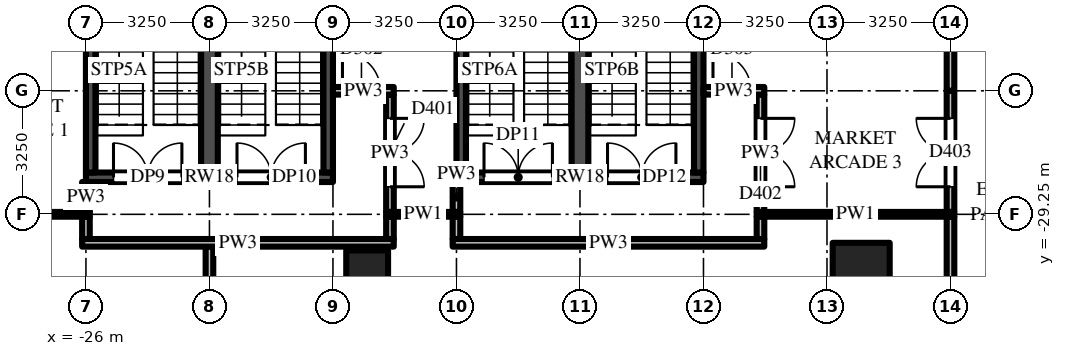
"""IFC4 building model, lengths in metres.
Left out: names, types, materials, properties, quantities, classifications, styles, units other than length and angle.
Written with IfcOpenShell. Run it as: python <this file> out.ifc"""

import sys

from ifc_helpers import new_model, si_unit, direction, frame, frame_2d, origin, origin_2d, place, context, subcontext, project, spatial, rectangle, extrude, source, transform, mapped, element, fill, save


model = new_model("IFC4")
c1 = context("Model", 3, precision=1e-05, world=origin(), true_north=direction((0.0, 1.0)))
c2 = subcontext(c1, "Body", "Model", "MODEL_VIEW")
j1 = project(units=[si_unit("LENGTHUNIT", "METRE"), si_unit("PLANEANGLEUNIT", "RADIAN")], contexts=[c1])
p1 = place(None, origin())
s1 = spatial("IfcSite", under=j1, at=p1, CompositionType="ELEMENT")
p2 = place(p1, origin())
s2 = spatial("IfcBuilding", under=s1, at=p2, CompositionType="ELEMENT")
p3 = place(p2, frame((0.0, 0.0, 19.0)))
s3 = spatial("IfcBuildingStorey", under=s2, at=p3, CompositionType="ELEMENT", Elevation=19.0)
m1 = source(origin(), c2, "Body", "SweptSolid", [
    extrude(rectangle(XDim=1.5, YDim=1.5, at=origin_2d()), origin(), (0.0, 0.0, 1.0), 5.0),
])
p4 = place(p3, frame((-5.6, -30.75, 0.0), z_axis=(0.0, 0.0, 1.0), x_axis=(1.0, 0.0, 0.0)))
e1 = element("IfcColumn", 1, at=p4, inside=s3, PredefinedType="COLUMN", context=c2, shape_type="MappedRepresentation", body=[
    mapped(m1, transform((0.0, 0.0, 0.0))),
])
m2 = source(origin(), c2, "Body", "SweptSolid", [
    extrude(rectangle(XDim=1.1, YDim=1.1, at=origin_2d()), origin(), (0.0, 0.0, 1.0), 5.0),
])
p5 = place(p3, frame((-18.6, -30.75, 0.0), z_axis=(0.0, 0.0, 1.0), x_axis=(1.0, 0.0, 0.0)))
e2 = element("IfcColumn", 2, at=p5, inside=s3, PredefinedType="COLUMN", context=c2, shape_type="MappedRepresentation", body=[
    mapped(m2, transform((0.0, 0.0, 0.0))),
])
m3 = source(origin(), c2, "Body", "SweptSolid", [
    extrude(rectangle(XDim=6.5, YDim=0.25, at=frame_2d((3.25, 0.0))), origin(), (0.0, 0.0, 1.0), 4.7),
])
p6 = place(p3, frame((-26.0, -28.275, 0.0), z_axis=(0.0, 0.0, 1.0), x_axis=(1.0, 0.0, 0.0)))
e3 = element("IfcWall", 3, at=p6, inside=s3, PredefinedType="SHEAR", context=c2, shape_type="MappedRepresentation", body=[
    mapped(m3, transform((0.0, 0.0, 0.0))),
])
m4 = source(origin(), c2, "Body", "SweptSolid", [
    extrude(rectangle(XDim=1.8, YDim=2.1, at=frame_2d((0.9, 1.05))), frame((0.0, 0.135, 0.0), z_axis=(0.0, -1.0, 0.0), x_axis=(1.0, 0.0, 0.0)), (0.0, 0.0, 1.0), 0.27),
])
p7 = place(p6, frame((0.725, 0.0, 0.0)))
e4 = element("IfcOpeningElement", 4, at=p7, cuts=e3, PredefinedType="OPENING", context=c2, shape_type="MappedRepresentation", body=[
    mapped(m4, transform((0.0, 0.0, 0.0))),
])
p8 = place(p6, frame((3.975, 0.0, 0.0)))
e5 = element("IfcOpeningElement", 5, at=p8, cuts=e3, PredefinedType="OPENING", context=c2, shape_type="MappedRepresentation", body=[
    mapped(m4, transform((0.0, 0.0, 0.0))),
])
m5 = source(origin(), c2, "Body", "SweptSolid", [
    extrude(rectangle(XDim=8.3, YDim=0.25, at=frame_2d((4.15, 0.0))), origin(), (0.0, 0.0, 1.0), 4.7),
])
for number, where, z_axis, x_axis in (
    (6, (-25.875, -28.15, 0.0), (0.0, 0.0, 1.0), (0.0, 1.0, 0.0)),
    (7, (-19.625, -28.15, 0.0), (0.0, 0.0, 1.0), (0.0, 1.0, 0.0)),
):
    element("IfcWall", number, at=place(p3, frame(where, z_axis=z_axis, x_axis=x_axis)), inside=s3, PredefinedType="SHEAR", context=c2, shape_type="MappedRepresentation", body=[
        mapped(m5, transform((0.0, 0.0, 0.0))),
    ])
m6 = source(origin(), c2, "Body", "SweptSolid", [
    extrude(rectangle(XDim=8.3, YDim=0.44, at=frame_2d((4.15, 0.0))), origin(), (0.0, 0.0, 1.0), 4.7),
])
p9 = place(p3, frame((-22.75, -28.15, 0.0), z_axis=(0.0, 0.0, 1.0), x_axis=(0.0, 1.0, 0.0)))
e8 = element("IfcWall", 8, at=p9, inside=s3, PredefinedType="SHEAR", context=c2, shape_type="MappedRepresentation", body=[
    mapped(m6, transform((0.0, 0.0, 0.0))),
])
p10 = place(p3, frame((-16.25, -28.275, 0.0), z_axis=(0.0, 0.0, 1.0), x_axis=(1.0, 0.0, 0.0)))
e9 = element("IfcWall", 9, at=p10, inside=s3, PredefinedType="SHEAR", context=c2, shape_type="MappedRepresentation", body=[
    mapped(m3, transform((0.0, 0.0, 0.0))),
])
p11 = place(p10, frame((0.725, 0.0, 0.0)))
e10 = element("IfcOpeningElement", 10, at=p11, cuts=e9, PredefinedType="OPENING", context=c2, shape_type="MappedRepresentation", body=[
    mapped(m4, transform((0.0, 0.0, 0.0))),
])
p12 = place(p10, frame((3.975, 0.0, 0.0)))
e11 = element("IfcOpeningElement", 11, at=p12, cuts=e9, PredefinedType="OPENING", context=c2, shape_type="MappedRepresentation", body=[
    mapped(m4, transform((0.0, 0.0, 0.0))),
])
for number, where, z_axis, x_axis in (
    (12, (-16.125, -28.15, 0.0), (0.0, 0.0, 1.0), (0.0, 1.0, 0.0)),
    (13, (-9.875, -28.15, 0.0), (0.0, 0.0, 1.0), (0.0, 1.0, 0.0)),
):
    element("IfcWall", number, at=place(p3, frame(where, z_axis=z_axis, x_axis=x_axis)), inside=s3, PredefinedType="SHEAR", context=c2, shape_type="MappedRepresentation", body=[
        mapped(m5, transform((0.0, 0.0, 0.0))),
    ])
p13 = place(p3, frame((-13.0, -28.15, 0.0), z_axis=(0.0, 0.0, 1.0), x_axis=(0.0, 1.0, 0.0)))
e14 = element("IfcWall", 14, at=p13, inside=s3, PredefinedType="SHEAR", context=c2, shape_type="MappedRepresentation", body=[
    mapped(m6, transform((0.0, 0.0, 0.0))),
])
m7 = source(origin(), c2, "Body", "SweptSolid", [
    extrude(rectangle(XDim=0.788, YDim=0.2, at=frame_2d((0.394, 0.0))), origin(), (0.0, 0.0, 1.0), 4.7),
])
p14 = place(p3, frame((-26.0, -29.188, 0.0), z_axis=(0.0, 0.0, 1.0), x_axis=(0.0, 1.0, 0.0)))
e15 = element("IfcWall", 15, at=p14, inside=s3, PredefinedType="PARTITIONING", context=c2, shape_type="MappedRepresentation", body=[
    mapped(m7, transform((0.0, 0.0, 0.0))),
])
m8 = source(origin(), c2, "Body", "SweptSolid", [
    extrude(rectangle(XDim=0.587, YDim=0.2, at=frame_2d((0.294, 0.0))), origin(), (0.0, 0.0, 1.0), 4.7),
])
p15 = place(p3, frame((-26.0, -29.9, 0.0), z_axis=(0.0, 0.0, 1.0), x_axis=(0.0, 1.0, 0.0)))
e16 = element("IfcWall", 16, at=p15, inside=s3, PredefinedType="PARTITIONING", context=c2, shape_type="MappedRepresentation", body=[
    mapped(m8, transform((0.0, 0.0, 0.0))),
])
m9 = source(origin(), c2, "Body", "SweptSolid", [
    extrude(rectangle(XDim=8.7, YDim=0.2, at=frame_2d((4.35, 0.0))), origin(), (0.0, 0.0, 1.0), 3.762),
])
p16 = place(p3, frame((-22.75, -38.8, 0.0), z_axis=(0.0, 0.0, 1.0), x_axis=(0.0, 1.0, 0.0)))
e17 = element("IfcWall", 17, at=p16, inside=s3, PredefinedType="PARTITIONING", context=c2, shape_type="MappedRepresentation", body=[
    mapped(m9, transform((0.0, 0.0, 0.0))),
])
m10 = source(origin(), c2, "Body", "SweptSolid", [
    extrude(rectangle(XDim=3.087, YDim=0.2, at=frame_2d((1.544, 0.0))), origin(), (0.0, 0.0, 1.0), 4.274),
])
p17 = place(p3, frame((-18.0, -26.1, 0.0), z_axis=(0.0, 0.0, 1.0), x_axis=(0.0, -1.0, 0.0)))
e18 = element("IfcWall", 18, at=p17, inside=s3, PredefinedType="PARTITIONING", context=c2, shape_type="MappedRepresentation", body=[
    mapped(m10, transform((0.0, 0.0, 0.0))),
])
m11 = source(origin(), c2, "Body", "SweptSolid", [
    extrude(rectangle(XDim=1.8, YDim=2.1, at=frame_2d((0.9, 1.05))), frame((0.0, 0.11, 0.0), z_axis=(0.0, -1.0, 0.0), x_axis=(1.0, 0.0, 0.0)), (0.0, 0.0, 1.0), 0.22),
])
p18 = place(p17, frame((0.625, 0.0, 0.0)))
e19 = element("IfcOpeningElement", 19, at=p18, cuts=e18, PredefinedType="OPENING", context=c2, shape_type="MappedRepresentation", body=[
    mapped(m11, transform((0.0, 0.0, 0.0))),
])
p19 = place(p3, frame((-18.0, -29.312, 0.0), z_axis=(0.0, 0.0, 1.0), x_axis=(0.0, -1.0, 0.0)))
e20 = element("IfcWall", 20, at=p19, inside=s3, PredefinedType="PARTITIONING", context=c2, shape_type="MappedRepresentation", body=[
    mapped(m8, transform((0.0, 0.0, 0.0))),
])
p20 = place(p3, frame((-16.25, -29.188, 0.0), z_axis=(0.0, 0.0, 1.0), x_axis=(0.0, 1.0, 0.0)))
e21 = element("IfcWall", 21, at=p20, inside=s3, PredefinedType="PARTITIONING", context=c2, shape_type="MappedRepresentation", body=[
    mapped(m7, transform((0.0, 0.0, 0.0))),
])
p21 = place(p3, frame((-16.25, -29.312, 0.0), z_axis=(0.0, 0.0, 1.0), x_axis=(0.0, -1.0, 0.0)))
e22 = element("IfcWall", 22, at=p21, inside=s3, PredefinedType="PARTITIONING", context=c2, shape_type="MappedRepresentation", body=[
    mapped(m8, transform((0.0, 0.0, 0.0))),
])
p22 = place(p3, frame((-8.25, -26.1, 0.0), z_axis=(0.0, 0.0, 1.0), x_axis=(0.0, -1.0, 0.0)))
e23 = element("IfcWall", 23, at=p22, inside=s3, PredefinedType="PARTITIONING", context=c2, shape_type="MappedRepresentation", body=[
    mapped(m10, transform((0.0, 0.0, 0.0))),
])
p23 = place(p22, frame((0.625, 0.0, 0.0)))
e24 = element("IfcOpeningElement", 24, at=p23, cuts=e23, PredefinedType="OPENING", context=c2, shape_type="MappedRepresentation", body=[
    mapped(m11, transform((0.0, 0.0, 0.0))),
])
p24 = place(p3, frame((-8.25, -29.9, 0.0), z_axis=(0.0, 0.0, 1.0), x_axis=(0.0, 1.0, 0.0)))
e25 = element("IfcWall", 25, at=p24, inside=s3, PredefinedType="PARTITIONING", context=c2, shape_type="MappedRepresentation", body=[
    mapped(m8, transform((0.0, 0.0, 0.0))),
])
m12 = source(origin(), c2, "Body", "SweptSolid", [
    extrude(rectangle(XDim=3.188, YDim=0.2, at=frame_2d((1.594, 0.0))), origin(), (0.0, 0.0, 1.0), 4.7),
])
p25 = place(p3, frame((-3.25, -29.188, 0.0), z_axis=(0.0, 0.0, 1.0), x_axis=(0.0, 1.0, 0.0)))
e26 = element("IfcWall", 26, at=p25, inside=s3, PredefinedType="PARTITIONING", context=c2, shape_type="MappedRepresentation", body=[
    mapped(m12, transform((0.0, 0.0, 0.0))),
])
p26 = place(p25, frame((0.663, 0.0, 0.0)))
e27 = element("IfcOpeningElement", 27, at=p26, cuts=e26, PredefinedType="OPENING", context=c2, shape_type="MappedRepresentation", body=[
    mapped(m11, transform((0.0, 0.0, 0.0))),
])
m13 = source(origin(), c2, "Body", "SweptSolid", [
    extrude(rectangle(XDim=6.4, YDim=0.2, at=frame_2d((3.2, 0.0))), origin(), (0.0, 0.0, 1.0), 4.7),
])
p27 = place(p3, frame((-3.25, -19.6, 0.0), z_axis=(0.0, 0.0, 1.0), x_axis=(0.0, -1.0, 0.0)))
e28 = element("IfcWall", 28, at=p27, inside=s3, PredefinedType="PARTITIONING", context=c2, shape_type="MappedRepresentation", body=[
    mapped(m13, transform((0.0, 0.0, 0.0))),
])
m14 = source(origin(), c2, "Body", "SweptSolid", [
    extrude(rectangle(XDim=9.488, YDim=0.2, at=frame_2d((4.744, 0.0))), origin(), (0.0, 0.0, 1.0), 3.918),
])
p28 = place(p3, frame((-3.25, -38.8, 0.0), z_axis=(0.0, 0.0, 1.0), x_axis=(0.0, 1.0, 0.0)))
e29 = element("IfcWall", 29, at=p28, inside=s3, PredefinedType="PARTITIONING", context=c2, shape_type="MappedRepresentation", body=[
    mapped(m14, transform((0.0, 0.0, 0.0))),
])
p29 = place(p28, frame((0.15, 0.0, 0.0)))
e30 = element("IfcOpeningElement", 30, at=p29, cuts=e29, PredefinedType="OPENING", context=c2, shape_type="MappedRepresentation", body=[
    mapped(m11, transform((0.0, 0.0, 0.0))),
])
m15 = source(origin(), c2, "Body", "SweptSolid", [
    extrude(rectangle(XDim=8.2, YDim=0.2, at=frame_2d((4.1, 0.0))), origin(), (0.0, 0.0, 1.0), 3.762),
])
p30 = place(p3, frame((-17.9, -30.0, 0.0), z_axis=(0.0, 0.0, 1.0), x_axis=(-1.0, 0.0, 0.0)))
e31 = element("IfcWall", 31, at=p30, inside=s3, PredefinedType="PARTITIONING", context=c2, shape_type="MappedRepresentation", body=[
    mapped(m15, transform((0.0, 0.0, 0.0))),
])
m16 = source(origin(), c2, "Body", "SweptSolid", [
    extrude(rectangle(XDim=8.2, YDim=0.2, at=frame_2d((4.1, 0.0))), origin(), (0.0, 0.0, 1.0), 4.7),
])
p31 = place(p3, frame((-8.15, -30.0, 0.0), z_axis=(0.0, 0.0, 1.0), x_axis=(-1.0, 0.0, 0.0)))
e32 = element("IfcWall", 32, at=p31, inside=s3, PredefinedType="PARTITIONING", context=c2, shape_type="MappedRepresentation", body=[
    mapped(m16, transform((0.0, 0.0, 0.0))),
])
p32 = place(p3, frame((-25.9, -29.25, 0.0), z_axis=(0.0, 0.0, 1.0), x_axis=(-1.0, 0.0, 0.0)))
e33 = element("IfcWall", 33, at=p32, inside=s3, PredefinedType="PARTITIONING", context=c2, shape_type="SweptSolid", body=[
    extrude(rectangle(XDim=3.35, YDim=0.125, at=frame_2d((1.675, 0.0))), origin(), (0.0, 0.0, 1.0), 4.7),
])
m17 = source(origin(), c2, "Body", "SweptSolid", [
    extrude(rectangle(XDim=1.2, YDim=2.1, at=frame_2d((0.6, 1.05))), frame((0.0, 0.073, 0.0), z_axis=(0.0, -1.0, 0.0), x_axis=(1.0, 0.0, 0.0)), (0.0, 0.0, 1.0), 0.145),
])
p33 = place(p32, frame((1.8, 0.0, 0.0)))
e34 = element("IfcOpeningElement", 34, at=p33, cuts=e33, PredefinedType="OPENING", context=c2, shape_type="MappedRepresentation", body=[
    mapped(m17, transform((0.0, 0.0, 0.0))),
])
m18 = source(origin(), c2, "Body", "SweptSolid", [
    extrude(rectangle(XDim=1.95, YDim=0.125, at=frame_2d((0.975, 0.0))), origin(), (0.0, 0.0, 1.0), 4.7),
])
p34 = place(p3, frame((-16.15, -29.25, 0.0), z_axis=(0.0, 0.0, 1.0), x_axis=(-1.0, 0.0, 0.0)))
e35 = element("IfcWall", 35, at=p34, inside=s3, PredefinedType="PARTITIONING", context=c2, shape_type="MappedRepresentation", body=[
    mapped(m18, transform((0.0, 0.0, 0.0))),
])
m19 = source(origin(), c2, "Body", "SweptSolid", [
    extrude(rectangle(XDim=5.2, YDim=0.125, at=frame_2d((2.6, 0.0))), origin(), (0.0, 0.0, 1.0), 3.762),
])
p35 = place(p3, frame((-3.15, -29.25, 0.0), z_axis=(0.0, 0.0, 1.0), x_axis=(-1.0, 0.0, 0.0)))
e36 = element("IfcWall", 36, at=p35, inside=s3, PredefinedType="PARTITIONING", context=c2, shape_type="MappedRepresentation", body=[
    mapped(m19, transform((0.0, 0.0, 0.0))),
])
m20 = source(origin(), c2, "Body", "SweptSolid", [
    extrude(rectangle(XDim=1.6, YDim=0.2, at=frame_2d((0.8, 0.0))), origin(), (0.0, 0.0, 1.0), 3.762),
])
p36 = place(p3, frame((-19.5, -26.0, 0.0), z_axis=(0.0, 0.0, 1.0), x_axis=(1.0, 0.0, 0.0)))
e37 = element("IfcWall", 37, at=p36, inside=s3, PredefinedType="PARTITIONING", context=c2, shape_type="MappedRepresentation", body=[
    mapped(m20, transform((0.0, 0.0, 0.0))),
])
m21 = source(origin(), c2, "Body", "SweptSolid", [
    extrude(rectangle(XDim=1.0, YDim=2.1, at=frame_2d((0.5, 1.05))), frame((0.0, 0.11, 0.0), z_axis=(0.0, -1.0, 0.0), x_axis=(1.0, 0.0, 0.0)), (0.0, 0.0, 1.0), 0.22),
])
p37 = place(p36, frame((0.25, 0.0, 0.0)))
e38 = element("IfcOpeningElement", 38, at=p37, cuts=e37, PredefinedType="OPENING", context=c2, shape_type="MappedRepresentation", body=[
    mapped(m21, transform((0.0, 0.0, 0.0))),
])
m22 = source(origin(), c2, "Body", "SweptSolid", [
    extrude(rectangle(XDim=1.6, YDim=0.2, at=frame_2d((0.8, 0.0))), origin(), (0.0, 0.0, 1.0), 4.7),
])
p38 = place(p3, frame((-9.75, -26.0, 0.0), z_axis=(0.0, 0.0, 1.0), x_axis=(1.0, 0.0, 0.0)))
e39 = element("IfcWall", 39, at=p38, inside=s3, PredefinedType="PARTITIONING", context=c2, shape_type="MappedRepresentation", body=[
    mapped(m22, transform((0.0, 0.0, 0.0))),
])
p39 = place(p38, frame((0.25, 0.0, 0.0)))
e40 = element("IfcOpeningElement", 40, at=p39, cuts=e39, PredefinedType="OPENING", context=c2, shape_type="MappedRepresentation", body=[
    mapped(m21, transform((0.0, 0.0, 0.0))),
])
m23 = source(origin(), c2, "Body", "SweptSolid", [
    extrude(rectangle(XDim=1.8, YDim=2.1, at=frame_2d((0.9, 1.05))), frame((0.0, 0.025, 0.0), z_axis=(0.0, -1.0, 0.0), x_axis=(1.0, 0.0, 0.0)), (0.0, 0.0, 1.0), 0.05),
])
p40 = place(p7, origin())
e41 = element("IfcDoor", 41, at=p40, inside=s3, OperationType="DOUBLE_DOOR_SINGLE_SWING", PredefinedType="DOOR", context=c2, shape_type="MappedRepresentation", body=[
    mapped(m23, transform((0.0, 0.0, 0.0))),
])
fill(e4, e41)
p41 = place(p8, origin())
e42 = element("IfcDoor", 42, at=p41, inside=s3, OperationType="DOUBLE_DOOR_SINGLE_SWING", PredefinedType="DOOR", context=c2, shape_type="MappedRepresentation", body=[
    mapped(m23, transform((0.0, 0.0, 0.0))),
])
fill(e5, e42)
p42 = place(p11, origin())
e43 = element("IfcDoor", 43, at=p42, inside=s3, OperationType="DOUBLE_DOOR_SINGLE_SWING", PredefinedType="DOOR", context=c2, shape_type="MappedRepresentation", body=[
    mapped(m23, transform((0.0, 0.0, 0.0))),
])
fill(e10, e43)
p43 = place(p12, origin())
e44 = element("IfcDoor", 44, at=p43, inside=s3, OperationType="DOUBLE_DOOR_SINGLE_SWING", PredefinedType="DOOR", context=c2, shape_type="MappedRepresentation", body=[
    mapped(m23, transform((0.0, 0.0, 0.0))),
])
fill(e11, e44)
p44 = place(p18, origin())
e45 = element("IfcDoor", 45, at=p44, inside=s3, OperationType="DOUBLE_DOOR_SINGLE_SWING", PredefinedType="DOOR", context=c2, shape_type="MappedRepresentation", body=[
    mapped(m23, transform((0.0, 0.0, 0.0))),
])
fill(e19, e45)
p45 = place(p23, origin())
e46 = element("IfcDoor", 46, at=p45, inside=s3, OperationType="DOUBLE_DOOR_SINGLE_SWING", PredefinedType="DOOR", context=c2, shape_type="MappedRepresentation", body=[
    mapped(m23, transform((0.0, 0.0, 0.0))),
])
fill(e24, e46)
p46 = place(p26, origin())
e47 = element("IfcDoor", 47, at=p46, inside=s3, OperationType="DOUBLE_DOOR_SINGLE_SWING", PredefinedType="DOOR", context=c2, shape_type="MappedRepresentation", body=[
    mapped(m23, transform((0.0, 0.0, 0.0))),
])
fill(e27, e47)
m24 = source(origin(), c2, "Body", "SweptSolid", [
    extrude(rectangle(XDim=1.0, YDim=2.1, at=frame_2d((0.5, 1.05))), frame((0.0, 0.025, 0.0), z_axis=(0.0, -1.0, 0.0), x_axis=(1.0, 0.0, 0.0)), (0.0, 0.0, 1.0), 0.05),
])
p47 = place(p37, origin())
e48 = element("IfcDoor", 48, at=p47, inside=s3, OperationType="SINGLE_SWING_LEFT", PredefinedType="DOOR", context=c2, shape_type="MappedRepresentation", body=[
    mapped(m24, transform((0.0, 0.0, 0.0))),
])
fill(e38, e48)
p48 = place(p39, origin())
e49 = element("IfcDoor", 49, at=p48, inside=s3, OperationType="SINGLE_SWING_LEFT", PredefinedType="DOOR", context=c2, shape_type="MappedRepresentation", body=[
    mapped(m24, transform((0.0, 0.0, 0.0))),
])
fill(e40, e49)
save(model, sys.argv[1])
